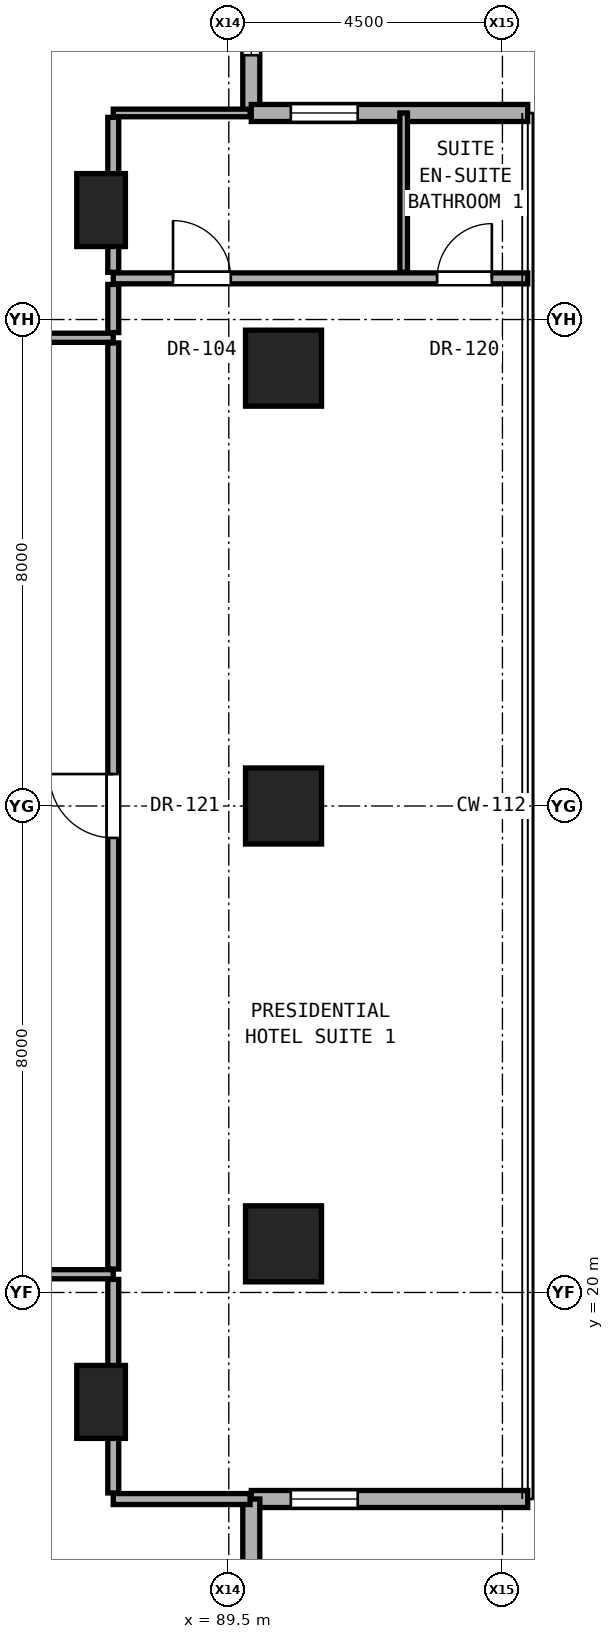
"""IFC4 building model, lengths in metres.
Left out: names, types, materials, properties, quantities, classifications, styles, units other than length and angle.
Written with IfcOpenShell. Run it as: python <this file> out.ifc"""

import sys

from ifc_helpers import new_model, si_unit, direction, frame, frame_2d, origin, origin_2d, place, context, subcontext, project, spatial, rectangle, hollow_rectangle, extrude, element, fill, save


model = new_model("IFC4")
c1 = context("Model", 3, precision=1e-05, world=origin(), true_north=direction((0.0, 1.0)))
c2 = subcontext(c1, "Body", "Model", "MODEL_VIEW")
j1 = project(units=[si_unit("LENGTHUNIT", "METRE"), si_unit("PLANEANGLEUNIT", "RADIAN")], contexts=[c1])
p1 = place(None, origin())
s1 = spatial("IfcSite", under=j1, at=p1, CompositionType="ELEMENT")
p2 = place(p1, origin())
s2 = spatial("IfcBuilding", under=s1, at=p2, CompositionType="ELEMENT")
p3 = place(p2, frame((0.0, 0.0, 58.7)))
s3 = spatial("IfcBuildingStorey", under=s2, at=p3, CompositionType="ELEMENT", Elevation=58.7)
for number, where, z_axis, x_axis in (
    (1, (90.4, 20.8, 0.0), (0.0, 0.0, 1.0), (1.0, 0.0, 0.0)),
    (2, (90.4, 28.0, 0.0), (0.0, 0.0, 1.0), (1.0, 0.0, 0.0)),
    (3, (90.4, 35.2, 0.0), (0.0, 0.0, 1.0), (1.0, 0.0, 0.0)),
):
    element("IfcColumn", number, at=place(p3, frame(where, z_axis=z_axis, x_axis=x_axis)), inside=s3, PredefinedType="COLUMN", context=c2, shape_type="SweptSolid", body=[
        extrude(hollow_rectangle(XDim=1.25, YDim=1.25, WallThickness=0.07, at=origin_2d()), origin(), (0.0, 0.0, 1.0), 3.3),
    ])
for number, where, z_axis, x_axis in (
    (4, (87.4, 18.2, 0.0), (0.0, 0.0, 1.0), (1.0, 0.0, 0.0)),
    (5, (87.4, 37.8, 0.0), (0.0, 0.0, 1.0), (1.0, 0.0, 0.0)),
):
    element("IfcColumn", number, at=place(p3, frame(where, z_axis=z_axis, x_axis=x_axis)), inside=s3, PredefinedType="PILASTER", context=c2, shape_type="SweptSolid", body=[
        extrude(rectangle(XDim=0.8, YDim=1.2, at=origin_2d()), origin(), (0.0, 0.0, 1.0), 3.3),
    ])
p4 = place(p3, frame((89.87, 39.396, 0.0), z_axis=(0.0, 0.0, 1.0), x_axis=(0.0, 1.0, 0.0)))
e6 = element("IfcWall", 6, at=p4, inside=s3, PredefinedType="SOLIDWALL", context=c2, shape_type="SweptSolid", body=[
    extrude(rectangle(XDim=4.546, YDim=0.28, at=frame_2d((2.273, 0.0))), origin(), (0.0, 0.0, 1.0), 3.04),
])
p5 = place(p4, frame((0.95, 0.0, 0.85)))
e7 = element("IfcOpeningElement", 7, at=p5, cuts=e6, PredefinedType="OPENING", context=c2, shape_type="SweptSolid", body=[
    extrude(rectangle(XDim=1.1, YDim=2.0, at=frame_2d((0.55, 1.0))), frame((0.0, 0.15, 0.0), z_axis=(0.0, -1.0, 0.0), x_axis=(1.0, 0.0, 0.0)), (0.0, 0.0, 1.0), 0.3),
])
p6 = place(p3, frame((89.87, 16.604, 0.0), z_axis=(0.0, 0.0, 1.0), x_axis=(1.0, 0.0, 0.0)))
e8 = element("IfcWall", 8, at=p6, inside=s3, PredefinedType="SOLIDWALL", context=c2, shape_type="SweptSolid", body=[
    extrude(rectangle(XDim=4.546, YDim=0.28, at=frame_2d((2.273, 0.0))), origin(), (0.0, 0.0, 1.0), 3.04),
])
p7 = place(p6, frame((0.65, 0.0, 0.85)))
e9 = element("IfcOpeningElement", 9, at=p7, cuts=e8, PredefinedType="OPENING", context=c2, shape_type="SweptSolid", body=[
    extrude(rectangle(XDim=1.1, YDim=2.0, at=frame_2d((0.55, 1.0))), frame((0.0, 0.15, 0.0), z_axis=(0.0, -1.0, 0.0), x_axis=(1.0, 0.0, 0.0)), (0.0, 0.0, 1.0), 0.3),
])
p8 = place(p3, frame((89.87, 12.057, 0.0), z_axis=(0.0, 0.0, 1.0), x_axis=(0.0, 1.0, 0.0)))
e10 = element("IfcWall", 10, at=p8, inside=s3, PredefinedType="SOLIDWALL", context=c2, shape_type="SweptSolid", body=[
    extrude(rectangle(XDim=4.546, YDim=0.28, at=frame_2d((2.273, 0.0))), origin(), (0.0, 0.0, 1.0), 3.04),
])
p9 = place(p3, frame((94.416, 39.396, 0.0), z_axis=(0.0, 0.0, 1.0), x_axis=(-1.0, 0.0, 0.0)))
e11 = element("IfcWall", 11, at=p9, inside=s3, PredefinedType="SOLIDWALL", context=c2, shape_type="SweptSolid", body=[
    extrude(rectangle(XDim=4.546, YDim=0.28, at=frame_2d((2.273, 0.0))), origin(), (0.0, 0.0, 1.0), 3.04),
])
p10 = place(p9, frame((2.796, 0.0, 0.85)))
e12 = element("IfcOpeningElement", 12, at=p10, cuts=e11, PredefinedType="OPENING", context=c2, shape_type="SweptSolid", body=[
    extrude(rectangle(XDim=1.1, YDim=2.0, at=frame_2d((0.55, 1.0))), frame((0.0, 0.15, 0.0), z_axis=(0.0, -1.0, 0.0), x_axis=(1.0, 0.0, 0.0)), (0.0, 0.0, 1.0), 0.3),
])
p11 = place(p3, frame((87.6, 16.603, 0.0), z_axis=(0.0, 0.0, 1.0), x_axis=(1.0, 0.0, 0.0)))
e13 = element("IfcWall", 13, at=p11, inside=s3, PredefinedType="PARTITIONING", context=c2, shape_type="SweptSolid", body=[
    extrude(rectangle(XDim=2.25, YDim=0.18, at=frame_2d((1.125, 0.0))), origin(), (0.0, 0.0, 1.0), 3.06),
])
for number, where, z_axis, x_axis in (
    (14, (86.25, 20.3, 0.0), (0.0, 0.0, 1.0), (1.0, 0.0, 0.0)),
    (15, (86.25, 35.7, 0.0), (0.0, 0.0, 1.0), (1.0, 0.0, 0.0)),
):
    element("IfcWall", number, at=place(p3, frame(where, z_axis=z_axis, x_axis=x_axis)), inside=s3, PredefinedType="PARTITIONING", context=c2, shape_type="SweptSolid", body=[
        extrude(rectangle(XDim=1.35, YDim=0.15, at=frame_2d((0.675, 0.0))), origin(), (0.0, 0.0, 1.0), 3.06),
    ])
p12 = place(p3, frame((87.6, 36.677, 0.0), z_axis=(0.0, 0.0, 1.0), x_axis=(1.0, 0.0, 0.0)))
e16 = element("IfcWall", 16, at=p12, inside=s3, PredefinedType="PARTITIONING", context=c2, shape_type="SweptSolid", body=[
    extrude(rectangle(XDim=6.816, YDim=0.18, at=frame_2d((3.408, 0.0))), origin(), (0.0, 0.0, 1.0), 2.436),
])
p13 = place(p12, frame((0.983, 0.0, 0.0)))
e17 = element("IfcOpeningElement", 17, at=p13, cuts=e16, PredefinedType="OPENING", context=c2, shape_type="SweptSolid", body=[
    extrude(rectangle(XDim=0.95, YDim=2.15, at=frame_2d((0.475, 1.075))), frame((0.0, 0.1, 0.0), z_axis=(0.0, -1.0, 0.0), x_axis=(1.0, 0.0, 0.0)), (0.0, 0.0, 1.0), 0.2),
])
p14 = place(p12, frame((5.326, 0.0, 0.0)))
e18 = element("IfcOpeningElement", 18, at=p14, cuts=e16, PredefinedType="OPENING", context=c2, shape_type="SweptSolid", body=[
    extrude(rectangle(XDim=0.9, YDim=2.1, at=frame_2d((0.45, 1.05))), frame((0.0, 0.1, 0.0), z_axis=(0.0, -1.0, 0.0), x_axis=(1.0, 0.0, 0.0)), (0.0, 0.0, 1.0), 0.2),
])
p15 = place(p3, frame((87.6, 39.397, 0.0), z_axis=(0.0, 0.0, 1.0), x_axis=(1.0, 0.0, 0.0)))
e19 = element("IfcWall", 19, at=p15, inside=s3, PredefinedType="PARTITIONING", context=c2, shape_type="SweptSolid", body=[
    extrude(rectangle(XDim=2.25, YDim=0.125, at=frame_2d((1.125, 0.0))), origin(), (0.0, 0.0, 1.0), 3.06),
])
p16 = place(p3, frame((87.6, 16.703, 0.0), z_axis=(0.0, 0.0, 1.0), x_axis=(0.0, 1.0, 0.0)))
e20 = element("IfcWall", 20, at=p16, inside=s3, PredefinedType="PARTITIONING", context=c2, shape_type="SweptSolid", body=[
    extrude(rectangle(XDim=3.512, YDim=0.18, at=frame_2d((1.756, 0.0))), origin(), (0.0, 0.0, 1.0), 2.436),
])
p17 = place(p3, frame((87.6, 20.385, 0.0), z_axis=(0.0, 0.0, 1.0), x_axis=(0.0, 1.0, 0.0)))
e21 = element("IfcWall", 21, at=p17, inside=s3, PredefinedType="PARTITIONING", context=c2, shape_type="SweptSolid", body=[
    extrude(rectangle(XDim=15.23, YDim=0.18, at=frame_2d((7.615, 0.0))), origin(), (0.0, 0.0, 1.0), 2.279),
])
p18 = place(p17, frame((7.09, 0.0, 0.0)))
e22 = element("IfcOpeningElement", 22, at=p18, cuts=e21, PredefinedType="OPENING", context=c2, shape_type="SweptSolid", body=[
    extrude(rectangle(XDim=1.05, YDim=2.2, at=frame_2d((0.525, 1.1))), frame((0.0, 0.1, 0.0), z_axis=(0.0, -1.0, 0.0), x_axis=(1.0, 0.0, 0.0)), (0.0, 0.0, 1.0), 0.2),
])
p19 = place(p3, frame((87.6, 35.785, 0.0), z_axis=(0.0, 0.0, 1.0), x_axis=(0.0, 1.0, 0.0)))
e23 = element("IfcWall", 23, at=p19, inside=s3, PredefinedType="PARTITIONING", context=c2, shape_type="SweptSolid", body=[
    extrude(rectangle(XDim=0.792, YDim=0.18, at=frame_2d((0.396, 0.0))), origin(), (0.0, 0.0, 1.0), 3.06),
])
p20 = place(p3, frame((87.6, 36.777, 0.0), z_axis=(0.0, 0.0, 1.0), x_axis=(0.0, 1.0, 0.0)))
e24 = element("IfcWall", 24, at=p20, inside=s3, PredefinedType="PARTITIONING", context=c2, shape_type="SweptSolid", body=[
    extrude(rectangle(XDim=2.547, YDim=0.18, at=frame_2d((1.274, 0.0))), origin(), (0.0, 0.0, 1.0), 2.436),
])
p21 = place(p3, frame((92.376, 36.777, 0.0), z_axis=(0.0, 0.0, 1.0), x_axis=(0.0, 1.0, 0.0)))
e25 = element("IfcWall", 25, at=p21, inside=s3, PredefinedType="PARTITIONING", context=c2, shape_type="SweptSolid", body=[
    extrude(rectangle(XDim=2.62, YDim=0.125, at=frame_2d((1.31, 0.0))), origin(), (0.0, 0.0, 1.0), 3.06),
])
p22 = place(p5, origin())
e26 = element("IfcWindow", 26, at=p22, inside=s3, PartitioningType="SINGLE_PANEL", PredefinedType="WINDOW", context=c2, shape_type="SweptSolid", body=[
    extrude(rectangle(XDim=1.1, YDim=2.0, at=frame_2d((0.55, 1.0))), frame((0.0, 0.03, 0.0), z_axis=(0.0, -1.0, 0.0), x_axis=(1.0, 0.0, 0.0)), (0.0, 0.0, 1.0), 0.06),
])
fill(e7, e26)
p23 = place(p7, origin())
e27 = element("IfcWindow", 27, at=p23, inside=s3, PartitioningType="SINGLE_PANEL", PredefinedType="WINDOW", context=c2, shape_type="SweptSolid", body=[
    extrude(rectangle(XDim=1.1, YDim=2.0, at=frame_2d((0.55, 1.0))), frame((0.0, 0.03, 0.0), z_axis=(0.0, -1.0, 0.0), x_axis=(1.0, 0.0, 0.0)), (0.0, 0.0, 1.0), 0.06),
])
fill(e9, e27)
p24 = place(p10, origin())
e28 = element("IfcWindow", 28, at=p24, inside=s3, PartitioningType="SINGLE_PANEL", PredefinedType="WINDOW", context=c2, shape_type="SweptSolid", body=[
    extrude(rectangle(XDim=1.1, YDim=2.0, at=frame_2d((0.55, 1.0))), frame((0.0, 0.03, 0.0), z_axis=(0.0, -1.0, 0.0), x_axis=(1.0, 0.0, 0.0)), (0.0, 0.0, 1.0), 0.06),
])
fill(e12, e28)
p25 = place(p18, origin())
e29 = element("IfcDoor", 29, at=p25, inside=s3, OperationType="SINGLE_SWING_RIGHT", PredefinedType="DOOR", context=c2, shape_type="SweptSolid", body=[
    extrude(rectangle(XDim=1.05, YDim=2.2, at=frame_2d((0.525, 1.1))), frame((0.0, 0.025, 0.0), z_axis=(0.0, -1.0, 0.0), x_axis=(1.0, 0.0, 0.0)), (0.0, 0.0, 1.0), 0.05),
])
fill(e22, e29)
p26 = place(p13, origin())
e30 = element("IfcDoor", 30, at=p26, inside=s3, OperationType="SINGLE_SWING_LEFT", PredefinedType="DOOR", context=c2, shape_type="SweptSolid", body=[
    extrude(rectangle(XDim=0.95, YDim=2.15, at=frame_2d((0.475, 1.075))), frame((0.0, 0.025, 0.0), z_axis=(0.0, -1.0, 0.0), x_axis=(1.0, 0.0, 0.0)), (0.0, 0.0, 1.0), 0.05),
])
fill(e17, e30)
p27 = place(p14, origin())
e31 = element("IfcDoor", 31, at=p27, inside=s3, OperationType="SINGLE_SWING_RIGHT", PredefinedType="DOOR", context=c2, shape_type="SweptSolid", body=[
    extrude(rectangle(XDim=0.9, YDim=2.1, at=frame_2d((0.45, 1.05))), frame((0.0, 0.025, 0.0), z_axis=(0.0, -1.0, 0.0), x_axis=(1.0, 0.0, 0.0)), (0.0, 0.0, 1.0), 0.05),
])
fill(e18, e31)
save(model, sys.argv[1])
